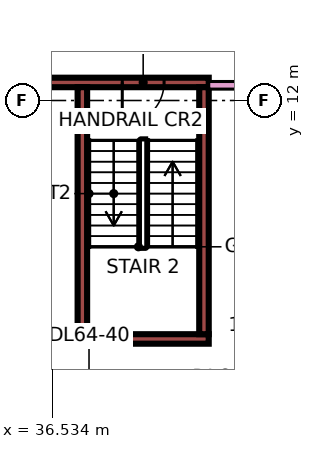
"""IFC4 building model, lengths in metres.
Left out: names, types, materials, properties, quantities, classifications, styles, units other than length and angle.
Written with IfcOpenShell. Run it as: python <this file> out.ifc"""

import sys

from ifc_helpers import new_model, si_unit, direction, frame, frame_2d, origin, place, context, subcontext, project, spatial, rectangle, extrude, element, fill, save


model = new_model("IFC4")
c1 = context("Model", 3, precision=1e-05, world=origin(), true_north=direction((0.0, 1.0)))
c2 = subcontext(c1, "Body", "Model", "MODEL_VIEW")
j1 = project(units=[si_unit("LENGTHUNIT", "METRE"), si_unit("PLANEANGLEUNIT", "RADIAN")], contexts=[c1])
p1 = place(None, origin())
s1 = spatial("IfcSite", under=j1, at=p1, CompositionType="ELEMENT")
p2 = place(p1, origin())
s2 = spatial("IfcBuilding", under=s1, at=p2, CompositionType="ELEMENT")
p3 = place(p2, frame((0.0, 0.0, 277.15)))
s3 = spatial("IfcBuildingStorey", under=s2, at=p3, CompositionType="ELEMENT", Elevation=277.15)
p4 = place(p3, frame((37.2, 5.725, 0.0), z_axis=(0.0, 0.0, 1.0), x_axis=(1.0, 0.0, 0.0)))
e1 = element("IfcWall", 1, at=p4, inside=s3, PredefinedType="SHEAR", context=c2, shape_type="SweptSolid", body=[
    extrude(rectangle(XDim=3.45, YDim=0.25, at=frame_2d((1.725, 0.0))), origin(), (0.0, 0.0, 1.0), 3.75),
])
p5 = place(p3, frame((36.4, 12.475, 0.0), z_axis=(0.0, 0.0, 1.0), x_axis=(1.0, 0.0, 0.0)))
e2 = element("IfcWall", 2, at=p5, inside=s3, PredefinedType="SHEAR", context=c2, shape_type="SweptSolid", body=[
    extrude(rectangle(XDim=4.25, YDim=0.25, at=frame_2d((2.125, 0.0))), origin(), (0.0, 0.0, 1.0), 3.75),
])
p6 = place(p5, frame((1.975, 0.0, 0.0)))
e3 = element("IfcOpeningElement", 3, at=p6, cuts=e2, PredefinedType="OPENING", context=c2, shape_type="SweptSolid", body=[
    extrude(rectangle(XDim=1.1, YDim=2.2, at=frame_2d((0.55, 1.1))), frame((0.0, 0.135, 0.0), z_axis=(0.0, -1.0, 0.0), x_axis=(1.0, 0.0, 0.0)), (0.0, 0.0, 1.0), 0.27),
])
for number, where, z_axis, x_axis in (
    (4, (37.325, 5.85, 0.0), (0.0, 0.0, 1.0), (0.0, 1.0, 0.0)),
    (5, (40.525, 5.85, 0.0), (0.0, 0.0, 1.0), (0.0, 1.0, 0.0)),
):
    element("IfcWall", number, at=place(p3, frame(where, z_axis=z_axis, x_axis=x_axis)), inside=s3, PredefinedType="SHEAR", context=c2, shape_type="SweptSolid", body=[
        extrude(rectangle(XDim=6.5, YDim=0.25, at=frame_2d((3.25, 0.0))), origin(), (0.0, 0.0, 1.0), 3.75),
    ])
p7 = place(p3, frame((40.65, 12.4, 0.0), z_axis=(0.0, 0.0, 1.0), x_axis=(1.0, 0.0, 0.0)))
e6 = element("IfcWall", 6, at=p7, inside=s3, PredefinedType="PARTITIONING", context=c2, shape_type="SweptSolid", body=[
    extrude(rectangle(XDim=22.35, YDim=0.2, at=frame_2d((11.175, 0.0))), origin(), (0.0, 0.0, 1.0), 3.35),
])
p8 = place(p7, frame((14.25, 0.0, 0.0)))
e7 = element("IfcOpeningElement", 7, at=p8, cuts=e6, PredefinedType="OPENING", context=c2, shape_type="SweptSolid", body=[
    extrude(rectangle(XDim=1.0, YDim=2.1, at=frame_2d((0.5, 1.05))), frame((0.0, 0.11, 0.0), z_axis=(0.0, -1.0, 0.0), x_axis=(1.0, 0.0, 0.0)), (0.0, 0.0, 1.0), 0.22),
])
p9 = place(p7, frame((1.05, 0.0, 0.0)))
e8 = element("IfcOpeningElement", 8, at=p9, cuts=e6, PredefinedType="OPENING", context=c2, shape_type="SweptSolid", body=[
    extrude(rectangle(XDim=1.0, YDim=2.1, at=frame_2d((0.5, 1.05))), frame((0.0, 0.11, 0.0), z_axis=(0.0, -1.0, 0.0), x_axis=(1.0, 0.0, 0.0)), (0.0, 0.0, 1.0), 0.22),
])
p10 = place(p6, frame((1.1, 0.0, 0.0), z_axis=(0.0, 0.0, 1.0), x_axis=(-1.0, 0.0, 0.0)))
e9 = element("IfcDoor", 9, at=p10, inside=s3, OperationType="SINGLE_SWING_LEFT", PredefinedType="DOOR", context=c2, shape_type="SweptSolid", body=[
    extrude(rectangle(XDim=1.1, YDim=2.2, at=frame_2d((0.55, 1.1))), frame((0.0, 0.025, 0.0), z_axis=(0.0, -1.0, 0.0), x_axis=(1.0, 0.0, 0.0)), (0.0, 0.0, 1.0), 0.05),
])
fill(e3, e9)
save(model, sys.argv[1])
